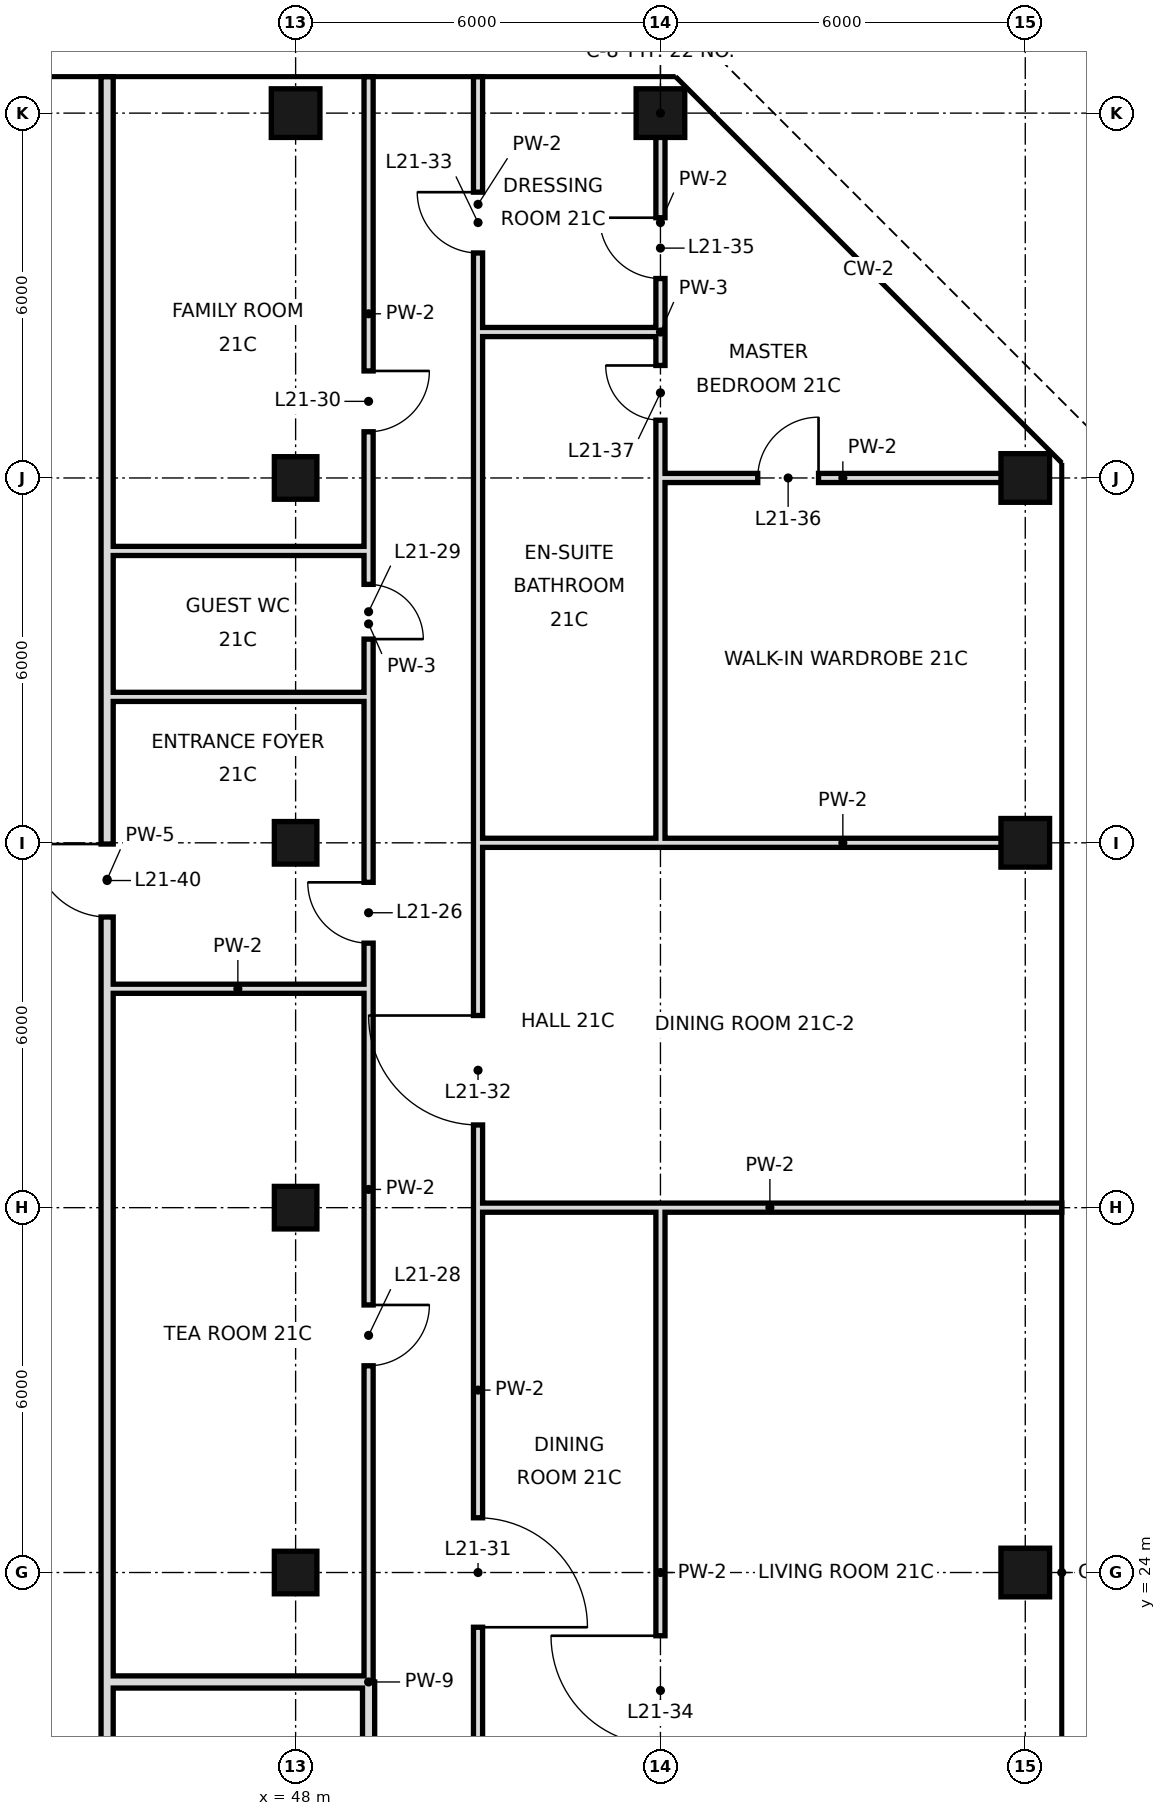
"""IFC4 building model, lengths in metres.
Left out: names, types, materials, properties, quantities, classifications, styles, units other than length and angle.
Written with IfcOpenShell. Run it as: python <this file> out.ifc"""

import sys

from ifc_helpers import new_model, si_unit, direction, frame, frame_2d, origin, origin_2d, place, context, subcontext, project, spatial, rectangle, hollow_rectangle, extrude, element, fill, save


model = new_model("IFC4")
c1 = context("Model", 3, precision=1e-05, world=origin(), true_north=direction((0.0, 1.0)))
c2 = subcontext(c1, "Body", "Model", "MODEL_VIEW")
j1 = project(units=[si_unit("LENGTHUNIT", "METRE"), si_unit("PLANEANGLEUNIT", "RADIAN")], contexts=[c1])
p1 = place(None, origin())
s1 = spatial("IfcSite", under=j1, at=p1, CompositionType="ELEMENT")
p2 = place(p1, origin())
s2 = spatial("IfcBuilding", under=s1, at=p2, CompositionType="ELEMENT")
p3 = place(p2, frame((0.0, 0.0, 99.8)))
s3 = spatial("IfcBuildingStorey", under=s2, at=p3, CompositionType="ELEMENT", Elevation=99.8)
for number, where, z_axis, x_axis in (
    (1, (48.0, 24.0, 0.0), (0.0, 0.0, 1.0), (1.0, 0.0, 0.0)),
    (2, (48.0, 30.0, 0.0), (0.0, 0.0, 1.0), (1.0, 0.0, 0.0)),
    (3, (48.0, 36.0, 0.0), (0.0, 0.0, 1.0), (1.0, 0.0, 0.0)),
    (4, (48.0, 42.0, 0.0), (0.0, 0.0, 1.0), (1.0, 0.0, 0.0)),
):
    element("IfcColumn", number, at=place(p3, frame(where, z_axis=z_axis, x_axis=x_axis)), inside=s3, PredefinedType="COLUMN", context=c2, shape_type="SweptSolid", body=[
        extrude(hollow_rectangle(XDim=0.7, YDim=0.7, WallThickness=0.036, at=origin_2d()), origin(), (0.0, 0.0, 1.0), 3.6),
    ])
for number, where, z_axis, x_axis in (
    (5, (48.0, 48.0, 0.0), (0.0, 0.0, 1.0), (1.0, 0.0, 0.0)),
    (6, (54.0, 48.0, 0.0), (0.0, 0.0, 1.0), (1.0, 0.0, 0.0)),
    (7, (60.0, 24.0, 0.0), (0.0, 0.0, 1.0), (1.0, 0.0, 0.0)),
    (8, (60.0, 36.0, 0.0), (0.0, 0.0, 1.0), (1.0, 0.0, 0.0)),
    (9, (60.0, 42.0, 0.0), (0.0, 0.0, 1.0), (1.0, 0.0, 0.0)),
):
    element("IfcColumn", number, at=place(p3, frame(where, z_axis=z_axis, x_axis=x_axis)), inside=s3, PredefinedType="COLUMN", context=c2, shape_type="SweptSolid", body=[
        extrude(hollow_rectangle(XDim=0.8, YDim=0.8, WallThickness=0.04, at=origin_2d()), origin(), (0.0, 0.0, 1.0), 3.6),
    ])
p4 = place(p3, frame((44.9, 22.2, 0.0), z_axis=(0.0, 0.0, 1.0), x_axis=(0.0, 1.0, 0.0)))
e10 = element("IfcWall", 10, at=p4, inside=s3, PredefinedType="SOLIDWALL", context=c2, shape_type="SweptSolid", body=[
    extrude(rectangle(XDim=26.4, YDim=0.2, at=frame_2d((13.2, 0.0))), origin(), (0.0, 0.0, 1.0), 2.72),
])
p5 = place(p4, frame((12.58, 0.0, 0.0)))
e11 = element("IfcOpeningElement", 11, at=p5, cuts=e10, PredefinedType="OPENING", context=c2, shape_type="SweptSolid", body=[
    extrude(rectangle(XDim=1.2, YDim=2.4, at=frame_2d((0.6, 1.2))), frame((0.0, 0.11, 0.0), z_axis=(0.0, -1.0, 0.0), x_axis=(1.0, 0.0, 0.0)), (0.0, 0.0, 1.0), 0.22),
])
p6 = place(p3, frame((44.9, 18.0, 0.0), z_axis=(0.0, 0.0, 1.0), x_axis=(0.0, 1.0, 0.0)))
e12 = element("IfcWall", 12, at=p6, inside=s3, PredefinedType="SOLIDWALL", context=c2, shape_type="SweptSolid", body=[
    extrude(rectangle(XDim=4.2, YDim=0.2, at=frame_2d((2.1, 0.0))), origin(), (0.0, 0.0, 1.0), 2.97),
])
p7 = place(p3, frame((49.2, 18.0, 0.0), z_axis=(0.0, 0.0, 1.0), x_axis=(0.0, 1.0, 0.0)))
e13 = element("IfcWall", 13, at=p7, inside=s3, PredefinedType="SOLIDWALL", context=c2, shape_type="SweptSolid", body=[
    extrude(rectangle(XDim=4.2, YDim=0.2, at=frame_2d((2.1, 0.0))), origin(), (0.0, 0.0, 1.0), 2.72),
])
p8 = place(p7, frame((2.14, 0.0, 0.0)))
e14 = element("IfcOpeningElement", 14, at=p8, cuts=e13, PredefinedType="OPENING", context=c2, shape_type="SweptSolid", body=[
    extrude(rectangle(XDim=1.0, YDim=2.4, at=frame_2d((0.5, 1.2))), frame((0.0, 0.11, 0.0), z_axis=(0.0, -1.0, 0.0), x_axis=(1.0, 0.0, 0.0)), (0.0, 0.0, 1.0), 0.22),
])
p9 = place(p3, frame((49.2, 22.2, 0.0), z_axis=(0.0, 0.0, 1.0), x_axis=(0.0, 1.0, 0.0)))
e15 = element("IfcWall", 15, at=p9, inside=s3, PredefinedType="PARTITIONING", context=c2, shape_type="SweptSolid", body=[
    extrude(rectangle(XDim=16.2, YDim=0.15, at=frame_2d((8.1, 0.0))), origin(), (0.0, 0.0, 1.0), 3.42),
])
p10 = place(p9, frame((12.15, 0.0, 0.0)))
e16 = element("IfcOpeningElement", 16, at=p10, cuts=e15, PredefinedType="OPENING", context=c2, shape_type="SweptSolid", body=[
    extrude(rectangle(XDim=1.0, YDim=2.4, at=frame_2d((0.5, 1.2))), frame((0.0, 0.085, 0.0), z_axis=(0.0, -1.0, 0.0), x_axis=(1.0, 0.0, 0.0)), (0.0, 0.0, 1.0), 0.17),
])
p11 = place(p9, frame((5.2, 0.0, 0.0)))
e17 = element("IfcOpeningElement", 17, at=p11, cuts=e15, PredefinedType="OPENING", context=c2, shape_type="SweptSolid", body=[
    extrude(rectangle(XDim=1.0, YDim=2.4, at=frame_2d((0.5, 1.2))), frame((0.0, 0.085, 0.0), z_axis=(0.0, -1.0, 0.0), x_axis=(1.0, 0.0, 0.0)), (0.0, 0.0, 1.0), 0.17),
])
p12 = place(p3, frame((49.2, 40.8, 0.0), z_axis=(0.0, 0.0, 1.0), x_axis=(0.0, 1.0, 0.0)))
e18 = element("IfcWall", 18, at=p12, inside=s3, PredefinedType="PARTITIONING", context=c2, shape_type="SweptSolid", body=[
    extrude(rectangle(XDim=7.8, YDim=0.15, at=frame_2d((3.9, 0.0))), origin(), (0.0, 0.0, 1.0), 3.42),
])
p13 = place(p12, frame((1.96, 0.0, 0.0)))
e19 = element("IfcOpeningElement", 19, at=p13, cuts=e18, PredefinedType="OPENING", context=c2, shape_type="SweptSolid", body=[
    extrude(rectangle(XDim=1.0, YDim=2.4, at=frame_2d((0.5, 1.2))), frame((0.0, 0.085, 0.0), z_axis=(0.0, -1.0, 0.0), x_axis=(1.0, 0.0, 0.0)), (0.0, 0.0, 1.0), 0.17),
])
p14 = place(p3, frame((49.2, 38.4, 0.0), z_axis=(0.0, 0.0, 1.0), x_axis=(0.0, 1.0, 0.0)))
e20 = element("IfcWall", 20, at=p14, inside=s3, PredefinedType="PARTITIONING", context=c2, shape_type="SweptSolid", body=[
    extrude(rectangle(XDim=2.4, YDim=0.15, at=frame_2d((1.2, 0.0))), origin(), (0.0, 0.0, 1.0), 3.42),
])
p15 = place(p14, frame((0.95, 0.0, 0.0)))
e21 = element("IfcOpeningElement", 21, at=p15, cuts=e20, PredefinedType="OPENING", context=c2, shape_type="SweptSolid", body=[
    extrude(rectangle(XDim=0.9, YDim=2.4, at=frame_2d((0.45, 1.2))), frame((0.0, 0.085, 0.0), z_axis=(0.0, -1.0, 0.0), x_axis=(1.0, 0.0, 0.0)), (0.0, 0.0, 1.0), 0.17),
])
p16 = place(p3, frame((51.0, 18.0, 0.0), z_axis=(0.0, 0.0, 1.0), x_axis=(0.0, 1.0, 0.0)))
e22 = element("IfcWall", 22, at=p16, inside=s3, PredefinedType="PARTITIONING", context=c2, shape_type="SweptSolid", body=[
    extrude(rectangle(XDim=18.0, YDim=0.15, at=frame_2d((9.0, 0.0))), origin(), (0.0, 0.0, 1.0), 3.42),
])
p17 = place(p16, frame((5.1, 0.0, 0.0)))
e23 = element("IfcOpeningElement", 23, at=p17, cuts=e22, PredefinedType="OPENING", context=c2, shape_type="SweptSolid", body=[
    extrude(rectangle(XDim=1.8, YDim=2.4, at=frame_2d((0.9, 1.2))), frame((0.0, 0.085, 0.0), z_axis=(0.0, -1.0, 0.0), x_axis=(1.0, 0.0, 0.0)), (0.0, 0.0, 1.0), 0.17),
])
p18 = place(p16, frame((13.36, 0.0, 0.0)))
e24 = element("IfcOpeningElement", 24, at=p18, cuts=e22, PredefinedType="OPENING", context=c2, shape_type="SweptSolid", body=[
    extrude(rectangle(XDim=1.8, YDim=2.4, at=frame_2d((0.9, 1.2))), frame((0.0, 0.085, 0.0), z_axis=(0.0, -1.0, 0.0), x_axis=(1.0, 0.0, 0.0)), (0.0, 0.0, 1.0), 0.17),
])
p19 = place(p3, frame((51.0, 44.4, 0.0), z_axis=(0.0, 0.0, 1.0), x_axis=(0.0, 1.0, 0.0)))
e25 = element("IfcWall", 25, at=p19, inside=s3, PredefinedType="PARTITIONING", context=c2, shape_type="SweptSolid", body=[
    extrude(rectangle(XDim=4.2, YDim=0.15, at=frame_2d((2.1, 0.0))), origin(), (0.0, 0.0, 1.0), 3.42),
])
p20 = place(p19, frame((1.3, 0.0, 0.0)))
e26 = element("IfcOpeningElement", 26, at=p20, cuts=e25, PredefinedType="OPENING", context=c2, shape_type="SweptSolid", body=[
    extrude(rectangle(XDim=1.0, YDim=2.4, at=frame_2d((0.5, 1.2))), frame((0.0, 0.085, 0.0), z_axis=(0.0, -1.0, 0.0), x_axis=(1.0, 0.0, 0.0)), (0.0, 0.0, 1.0), 0.17),
])
p21 = place(p3, frame((51.0, 36.0, 0.0), z_axis=(0.0, 0.0, 1.0), x_axis=(0.0, 1.0, 0.0)))
e27 = element("IfcWall", 27, at=p21, inside=s3, PredefinedType="PARTITIONING", context=c2, shape_type="SweptSolid", body=[
    extrude(rectangle(XDim=8.4, YDim=0.15, at=frame_2d((4.2, 0.0))), origin(), (0.0, 0.0, 1.0), 3.42),
])
p22 = place(p3, frame((54.0, 18.0, 0.0), z_axis=(0.0, 0.0, 1.0), x_axis=(0.0, 1.0, 0.0)))
e28 = element("IfcWall", 28, at=p22, inside=s3, PredefinedType="PARTITIONING", context=c2, shape_type="SweptSolid", body=[
    extrude(rectangle(XDim=12.0, YDim=0.15, at=frame_2d((6.0, 0.0))), origin(), (0.0, 0.0, 1.0), 3.42),
])
p23 = place(p22, frame((3.16, 0.0, 0.0)))
e29 = element("IfcOpeningElement", 29, at=p23, cuts=e28, PredefinedType="OPENING", context=c2, shape_type="SweptSolid", body=[
    extrude(rectangle(XDim=1.8, YDim=2.4, at=frame_2d((0.9, 1.2))), frame((0.0, 0.085, 0.0), z_axis=(0.0, -1.0, 0.0), x_axis=(1.0, 0.0, 0.0)), (0.0, 0.0, 1.0), 0.17),
])
p24 = place(p3, frame((54.0, 44.4, 0.0), z_axis=(0.0, 0.0, 1.0), x_axis=(0.0, 1.0, 0.0)))
e30 = element("IfcWall", 30, at=p24, inside=s3, PredefinedType="PARTITIONING", context=c2, shape_type="SweptSolid", body=[
    extrude(rectangle(XDim=3.6, YDim=0.15, at=frame_2d((1.8, 0.0))), origin(), (0.0, 0.0, 1.0), 3.42),
])
p25 = place(p24, frame((0.88, 0.0, 0.0)))
e31 = element("IfcOpeningElement", 31, at=p25, cuts=e30, PredefinedType="OPENING", context=c2, shape_type="SweptSolid", body=[
    extrude(rectangle(XDim=1.0, YDim=2.4, at=frame_2d((0.5, 1.2))), frame((0.0, 0.085, 0.0), z_axis=(0.0, -1.0, 0.0), x_axis=(1.0, 0.0, 0.0)), (0.0, 0.0, 1.0), 0.17),
])
p26 = place(p3, frame((54.0, 36.0, 0.0), z_axis=(0.0, 0.0, 1.0), x_axis=(0.0, 1.0, 0.0)))
e32 = element("IfcWall", 32, at=p26, inside=s3, PredefinedType="PARTITIONING", context=c2, shape_type="SweptSolid", body=[
    extrude(rectangle(XDim=8.4, YDim=0.15, at=frame_2d((4.2, 0.0))), origin(), (0.0, 0.0, 1.0), 3.42),
])
p27 = place(p26, frame((6.95, 0.0, 0.0)))
e33 = element("IfcOpeningElement", 33, at=p27, cuts=e32, PredefinedType="OPENING", context=c2, shape_type="SweptSolid", body=[
    extrude(rectangle(XDim=0.9, YDim=2.4, at=frame_2d((0.45, 1.2))), frame((0.0, 0.085, 0.0), z_axis=(0.0, -1.0, 0.0), x_axis=(1.0, 0.0, 0.0)), (0.0, 0.0, 1.0), 0.17),
])
p28 = place(p3, frame((44.9, 22.2, 0.0), z_axis=(0.0, 0.0, 1.0), x_axis=(1.0, 0.0, 0.0)))
e34 = element("IfcWall", 34, at=p28, inside=s3, PredefinedType="SOLIDWALL", context=c2, shape_type="SweptSolid", body=[
    extrude(rectangle(XDim=4.3, YDim=0.2, at=frame_2d((2.15, 0.0))), origin(), (0.0, 0.0, 1.0), 2.72),
])
p29 = place(p3, frame((51.0, 30.0, 0.0), z_axis=(0.0, 0.0, 1.0), x_axis=(1.0, 0.0, 0.0)))
e35 = element("IfcWall", 35, at=p29, inside=s3, PredefinedType="PARTITIONING", context=c2, shape_type="SweptSolid", body=[
    extrude(rectangle(XDim=9.6, YDim=0.15, at=frame_2d((4.8, 0.0))), origin(), (0.0, 0.0, 1.0), 2.72),
])
p30 = place(p3, frame((44.9, 33.6, 0.0), z_axis=(0.0, 0.0, 1.0), x_axis=(1.0, 0.0, 0.0)))
e36 = element("IfcWall", 36, at=p30, inside=s3, PredefinedType="PARTITIONING", context=c2, shape_type="SweptSolid", body=[
    extrude(rectangle(XDim=4.3, YDim=0.15, at=frame_2d((2.15, 0.0))), origin(), (0.0, 0.0, 1.0), 3.42),
])
p31 = place(p3, frame((54.0, 36.0, 0.0), z_axis=(0.0, 0.0, 1.0), x_axis=(1.0, 0.0, 0.0)))
e37 = element("IfcWall", 37, at=p31, inside=s3, PredefinedType="PARTITIONING", context=c2, shape_type="SweptSolid", body=[
    extrude(rectangle(XDim=6.0, YDim=0.15, at=frame_2d((3.0, 0.0))), origin(), (0.0, 0.0, 1.0), 2.72),
])
p32 = place(p3, frame((51.0, 36.0, 0.0), z_axis=(0.0, 0.0, 1.0), x_axis=(1.0, 0.0, 0.0)))
e38 = element("IfcWall", 38, at=p32, inside=s3, PredefinedType="PARTITIONING", context=c2, shape_type="SweptSolid", body=[
    extrude(rectangle(XDim=3.0, YDim=0.15, at=frame_2d((1.5, 0.0))), origin(), (0.0, 0.0, 1.0), 2.72),
])
for number, where, z_axis, x_axis in (
    (39, (44.9, 38.4, 0.0), (0.0, 0.0, 1.0), (1.0, 0.0, 0.0)),
    (40, (44.9, 40.8, 0.0), (0.0, 0.0, 1.0), (1.0, 0.0, 0.0)),
):
    element("IfcWall", number, at=place(p3, frame(where, z_axis=z_axis, x_axis=x_axis)), inside=s3, PredefinedType="PARTITIONING", context=c2, shape_type="SweptSolid", body=[
        extrude(rectangle(XDim=4.3, YDim=0.15, at=frame_2d((2.15, 0.0))), origin(), (0.0, 0.0, 1.0), 3.42),
    ])
p33 = place(p3, frame((54.0, 42.0, 0.0), z_axis=(0.0, 0.0, 1.0), x_axis=(1.0, 0.0, 0.0)))
e41 = element("IfcWall", 41, at=p33, inside=s3, PredefinedType="PARTITIONING", context=c2, shape_type="SweptSolid", body=[
    extrude(rectangle(XDim=6.0, YDim=0.15, at=frame_2d((3.0, 0.0))), origin(), (0.0, 0.0, 1.0), 2.72),
])
p34 = place(p33, frame((1.6, 0.0, 0.0)))
e42 = element("IfcOpeningElement", 42, at=p34, cuts=e41, PredefinedType="OPENING", context=c2, shape_type="SweptSolid", body=[
    extrude(rectangle(XDim=1.0, YDim=2.4, at=frame_2d((0.5, 1.2))), frame((0.0, 0.085, 0.0), z_axis=(0.0, -1.0, 0.0), x_axis=(1.0, 0.0, 0.0)), (0.0, 0.0, 1.0), 0.17),
])
p35 = place(p3, frame((51.0, 44.4, 0.0), z_axis=(0.0, 0.0, 1.0), x_axis=(1.0, 0.0, 0.0)))
e43 = element("IfcWall", 43, at=p35, inside=s3, PredefinedType="PARTITIONING", context=c2, shape_type="SweptSolid", body=[
    extrude(rectangle(XDim=3.0, YDim=0.15, at=frame_2d((1.5, 0.0))), origin(), (0.0, 0.0, 1.0), 3.42),
])
p36 = place(p10, frame((1.0, 0.0, 0.0), z_axis=(0.0, 0.0, 1.0), x_axis=(-1.0, 0.0, 0.0)))
e44 = element("IfcDoor", 44, at=p36, inside=s3, OperationType="SINGLE_SWING_LEFT", PredefinedType="DOOR", context=c2, shape_type="SweptSolid", body=[
    extrude(rectangle(XDim=1.0, YDim=2.4, at=frame_2d((0.5, 1.2))), frame((0.0, 0.025, 0.0), z_axis=(0.0, -1.0, 0.0), x_axis=(1.0, 0.0, 0.0)), (0.0, 0.0, 1.0), 0.05),
])
fill(e16, e44)
p37 = place(p11, origin())
e45 = element("IfcDoor", 45, at=p37, inside=s3, OperationType="SINGLE_SWING_RIGHT", PredefinedType="DOOR", context=c2, shape_type="SweptSolid", body=[
    extrude(rectangle(XDim=1.0, YDim=2.4, at=frame_2d((0.5, 1.2))), frame((0.0, 0.025, 0.0), z_axis=(0.0, -1.0, 0.0), x_axis=(1.0, 0.0, 0.0)), (0.0, 0.0, 1.0), 0.05),
])
fill(e17, e45)
p38 = place(p15, frame((0.9, 0.0, 0.0), z_axis=(0.0, 0.0, 1.0), x_axis=(-1.0, 0.0, 0.0)))
e46 = element("IfcDoor", 46, at=p38, inside=s3, OperationType="SINGLE_SWING_RIGHT", PredefinedType="DOOR", context=c2, shape_type="SweptSolid", body=[
    extrude(rectangle(XDim=0.9, YDim=2.4, at=frame_2d((0.45, 1.2))), frame((0.0, 0.025, 0.0), z_axis=(0.0, -1.0, 0.0), x_axis=(1.0, 0.0, 0.0)), (0.0, 0.0, 1.0), 0.05),
])
fill(e21, e46)
p39 = place(p13, origin())
e47 = element("IfcDoor", 47, at=p39, inside=s3, OperationType="SINGLE_SWING_RIGHT", PredefinedType="DOOR", context=c2, shape_type="SweptSolid", body=[
    extrude(rectangle(XDim=1.0, YDim=2.4, at=frame_2d((0.5, 1.2))), frame((0.0, 0.025, 0.0), z_axis=(0.0, -1.0, 0.0), x_axis=(1.0, 0.0, 0.0)), (0.0, 0.0, 1.0), 0.05),
])
fill(e19, e47)
p40 = place(p17, frame((1.8, 0.0, 0.0), z_axis=(0.0, 0.0, 1.0), x_axis=(-1.0, 0.0, 0.0)))
e48 = element("IfcDoor", 48, at=p40, inside=s3, OperationType="SINGLE_SWING_RIGHT", PredefinedType="DOOR", context=c2, shape_type="SweptSolid", body=[
    extrude(rectangle(XDim=1.8, YDim=2.4, at=frame_2d((0.9, 1.2))), frame((0.0, 0.025, 0.0), z_axis=(0.0, -1.0, 0.0), x_axis=(1.0, 0.0, 0.0)), (0.0, 0.0, 1.0), 0.05),
])
fill(e23, e48)
p41 = place(p18, frame((1.8, 0.0, 0.0), z_axis=(0.0, 0.0, 1.0), x_axis=(-1.0, 0.0, 0.0)))
e49 = element("IfcDoor", 49, at=p41, inside=s3, OperationType="SINGLE_SWING_LEFT", PredefinedType="DOOR", context=c2, shape_type="SweptSolid", body=[
    extrude(rectangle(XDim=1.8, YDim=2.4, at=frame_2d((0.9, 1.2))), frame((0.0, 0.025, 0.0), z_axis=(0.0, -1.0, 0.0), x_axis=(1.0, 0.0, 0.0)), (0.0, 0.0, 1.0), 0.05),
])
fill(e24, e49)
p42 = place(p20, frame((1.0, 0.0, 0.0), z_axis=(0.0, 0.0, 1.0), x_axis=(-1.0, 0.0, 0.0)))
e50 = element("IfcDoor", 50, at=p42, inside=s3, OperationType="SINGLE_SWING_LEFT", PredefinedType="DOOR", context=c2, shape_type="SweptSolid", body=[
    extrude(rectangle(XDim=1.0, YDim=2.4, at=frame_2d((0.5, 1.2))), frame((0.0, 0.025, 0.0), z_axis=(0.0, -1.0, 0.0), x_axis=(1.0, 0.0, 0.0)), (0.0, 0.0, 1.0), 0.05),
])
fill(e26, e50)
p43 = place(p23, frame((1.8, 0.0, 0.0), z_axis=(0.0, 0.0, 1.0), x_axis=(-1.0, 0.0, 0.0)))
e51 = element("IfcDoor", 51, at=p43, inside=s3, OperationType="SINGLE_SWING_LEFT", PredefinedType="DOOR", context=c2, shape_type="SweptSolid", body=[
    extrude(rectangle(XDim=1.8, YDim=2.4, at=frame_2d((0.9, 1.2))), frame((0.0, 0.025, 0.0), z_axis=(0.0, -1.0, 0.0), x_axis=(1.0, 0.0, 0.0)), (0.0, 0.0, 1.0), 0.05),
])
fill(e29, e51)
p44 = place(p25, frame((1.0, 0.0, 0.0), z_axis=(0.0, 0.0, 1.0), x_axis=(-1.0, 0.0, 0.0)))
e52 = element("IfcDoor", 52, at=p44, inside=s3, OperationType="SINGLE_SWING_LEFT", PredefinedType="DOOR", context=c2, shape_type="SweptSolid", body=[
    extrude(rectangle(XDim=1.0, YDim=2.4, at=frame_2d((0.5, 1.2))), frame((0.0, 0.025, 0.0), z_axis=(0.0, -1.0, 0.0), x_axis=(1.0, 0.0, 0.0)), (0.0, 0.0, 1.0), 0.05),
])
fill(e31, e52)
p45 = place(p34, frame((1.0, 0.0, 0.0), z_axis=(0.0, 0.0, 1.0), x_axis=(-1.0, 0.0, 0.0)))
e53 = element("IfcDoor", 53, at=p45, inside=s3, OperationType="SINGLE_SWING_LEFT", PredefinedType="DOOR", context=c2, shape_type="SweptSolid", body=[
    extrude(rectangle(XDim=1.0, YDim=2.4, at=frame_2d((0.5, 1.2))), frame((0.0, 0.025, 0.0), z_axis=(0.0, -1.0, 0.0), x_axis=(1.0, 0.0, 0.0)), (0.0, 0.0, 1.0), 0.05),
])
fill(e42, e53)
p46 = place(p27, frame((0.9, 0.0, 0.0), z_axis=(0.0, 0.0, 1.0), x_axis=(-1.0, 0.0, 0.0)))
e54 = element("IfcDoor", 54, at=p46, inside=s3, OperationType="SINGLE_SWING_LEFT", PredefinedType="DOOR", context=c2, shape_type="SweptSolid", body=[
    extrude(rectangle(XDim=0.9, YDim=2.4, at=frame_2d((0.45, 1.2))), frame((0.0, 0.025, 0.0), z_axis=(0.0, -1.0, 0.0), x_axis=(1.0, 0.0, 0.0)), (0.0, 0.0, 1.0), 0.05),
])
fill(e33, e54)
p47 = place(p5, frame((1.2, 0.0, 0.0), z_axis=(0.0, 0.0, 1.0), x_axis=(-1.0, 0.0, 0.0)))
e55 = element("IfcDoor", 55, at=p47, inside=s3, OperationType="SINGLE_SWING_LEFT", PredefinedType="DOOR", context=c2, shape_type="SweptSolid", body=[
    extrude(rectangle(XDim=1.2, YDim=2.4, at=frame_2d((0.6, 1.2))), frame((0.0, 0.025, 0.0), z_axis=(0.0, -1.0, 0.0), x_axis=(1.0, 0.0, 0.0)), (0.0, 0.0, 1.0), 0.05),
])
fill(e11, e55)
save(model, sys.argv[1])
